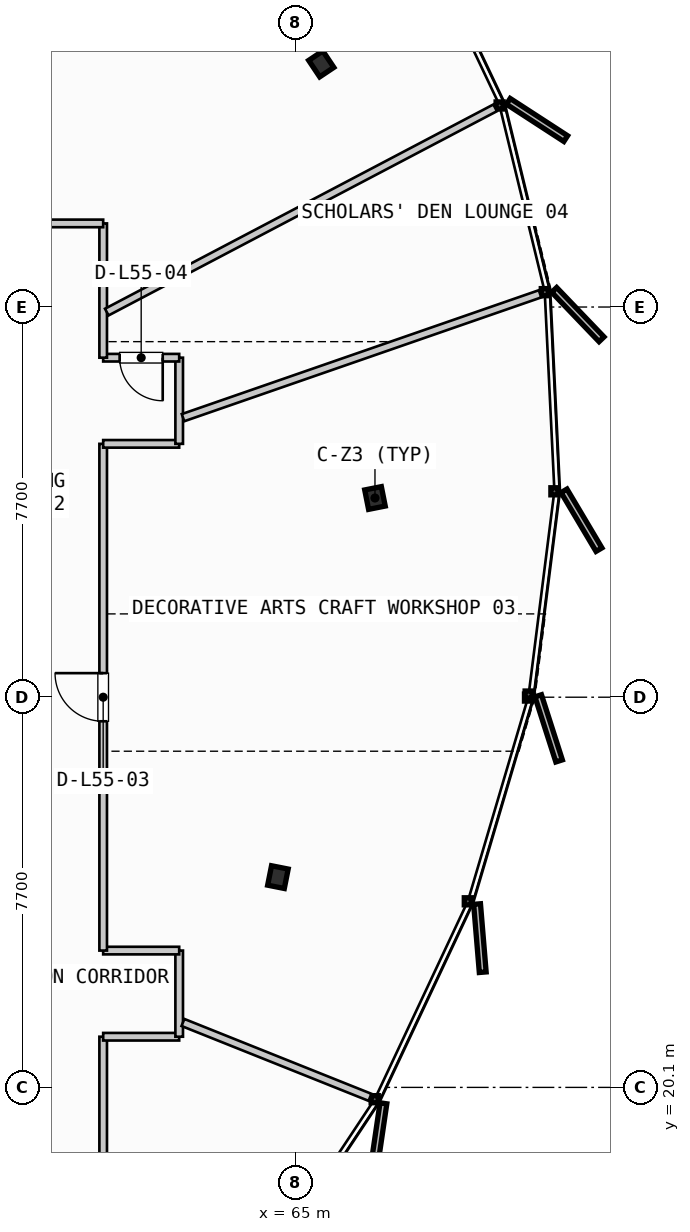
"""IFC4 building model, lengths in metres.
Left out: names, types, materials, properties, quantities, classifications, styles, units other than length and angle.
Written with IfcOpenShell. Run it as: python <this file> out.ifc"""

import sys

from ifc_helpers import new_model, si_unit, direction, frame, frame_2d, origin, origin_2d, place, context, subcontext, project, spatial, rectangle, i_section, extrude, source, transform, mapped, element, fill, save


model = new_model("IFC4")
c1 = context("Model", 3, precision=1e-05, world=origin(), true_north=direction((0.0, 1.0)))
c2 = subcontext(c1, "Body", "Model", "MODEL_VIEW")
j1 = project(units=[si_unit("LENGTHUNIT", "METRE"), si_unit("PLANEANGLEUNIT", "RADIAN")], contexts=[c1])
p1 = place(None, origin())
s1 = spatial("IfcSite", under=j1, at=p1, CompositionType="ELEMENT")
p2 = place(p1, origin())
s2 = spatial("IfcBuilding", under=s1, at=p2, CompositionType="ELEMENT")
p3 = place(p2, frame((0.0, 0.0, 211.4)))
s3 = spatial("IfcBuildingStorey", under=s2, at=p3, CompositionType="ELEMENT", Elevation=211.4)
m1 = source(origin(), c2, "Body", "SweptSolid", [
    extrude(i_section(OverallWidth=0.391, OverallDepth=0.335, WebThickness=0.023, FlangeThickness=0.034, FilletRadius=0.015, at=origin_2d()), origin(), (0.0, 0.0, 1.0), 3.26),
])
for number, where, z_axis, x_axis in (
    (1, (66.564, 31.731, 0.0), (0.0, 0.0, 1.0), (0.981, 0.195, 0.0)),
    (2, (65.504, 40.298, 0.0), (0.0, 0.0, 1.0), (0.831, 0.556, 0.0)),
    (3, (64.649, 24.25, 0.0), (0.0, 0.0, 1.0), (0.981, -0.195, 0.0)),
):
    element("IfcColumn", number, at=place(p3, frame(where, z_axis=z_axis, x_axis=x_axis)), inside=s3, PredefinedType="COLUMN", context=c2, shape_type="MappedRepresentation", body=[
        mapped(m1, transform((0.0, 0.0, 0.0), scale=1.0)),
    ])
p4 = place(p3, frame((61.2, 18.45, 0.0), z_axis=(0.0, 0.0, 1.0), x_axis=(0.0, 1.0, 0.0)))
e4 = element("IfcWall", 4, at=p4, inside=s3, PredefinedType="PARTITIONING", context=c2, shape_type="SweptSolid", body=[
    extrude(rectangle(XDim=2.65, YDim=0.15, at=frame_2d((1.325, 0.0))), origin(), (0.0, 0.0, 1.0), 2.455),
])
p5 = place(p3, frame((61.2, 21.1, 0.0), z_axis=(0.0, 0.0, 1.0), x_axis=(1.0, 0.0, 0.0)))
e5 = element("IfcWall", 5, at=p5, inside=s3, PredefinedType="PARTITIONING", context=c2, shape_type="SweptSolid", body=[
    extrude(rectangle(XDim=1.5, YDim=0.15, at=frame_2d((0.75, 0.0))), origin(), (0.0, 0.0, 1.0), 2.455),
])
p6 = place(p3, frame((62.7, 21.1, 0.0), z_axis=(0.0, 0.0, 1.0), x_axis=(0.0, 1.0, 0.0)))
e6 = element("IfcWall", 6, at=p6, inside=s3, PredefinedType="PARTITIONING", context=c2, shape_type="SweptSolid", body=[
    extrude(rectangle(XDim=1.7, YDim=0.15, at=frame_2d((0.85, 0.0))), origin(), (0.0, 0.0, 1.0), 2.455),
])
p7 = place(p3, frame((62.7, 22.8, 0.0), z_axis=(0.0, 0.0, 1.0), x_axis=(-1.0, 0.0, 0.0)))
e7 = element("IfcWall", 7, at=p7, inside=s3, PredefinedType="PARTITIONING", context=c2, shape_type="SweptSolid", body=[
    extrude(rectangle(XDim=1.5, YDim=0.15, at=frame_2d((0.75, 0.0))), origin(), (0.0, 0.0, 1.0), 2.455),
])
p8 = place(p3, frame((61.2, 22.8, 0.0), z_axis=(0.0, 0.0, 1.0), x_axis=(0.0, 1.0, 0.0)))
e8 = element("IfcWall", 8, at=p8, inside=s3, PredefinedType="PARTITIONING", context=c2, shape_type="SweptSolid", body=[
    extrude(rectangle(XDim=10.0, YDim=0.15, at=frame_2d((5.0, 0.0))), origin(), (0.0, 0.0, 1.0), 2.455),
])
p9 = place(p8, frame((4.525, 0.0, 0.0)))
e9 = element("IfcOpeningElement", 9, at=p9, cuts=e8, PredefinedType="OPENING", context=c2, shape_type="SweptSolid", body=[
    extrude(rectangle(XDim=0.95, YDim=2.15, at=frame_2d((0.475, 1.075))), frame((0.0, 0.085, 0.0), z_axis=(0.0, -1.0, 0.0), x_axis=(1.0, 0.0, 0.0)), (0.0, 0.0, 1.0), 0.17),
])
p10 = place(p3, frame((61.2, 32.8, 0.0), z_axis=(0.0, 0.0, 1.0), x_axis=(1.0, 0.0, 0.0)))
e10 = element("IfcWall", 10, at=p10, inside=s3, PredefinedType="PARTITIONING", context=c2, shape_type="SweptSolid", body=[
    extrude(rectangle(XDim=1.5, YDim=0.15, at=frame_2d((0.75, 0.0))), origin(), (0.0, 0.0, 1.0), 2.455),
])
p11 = place(p3, frame((62.7, 32.8, 0.0), z_axis=(0.0, 0.0, 1.0), x_axis=(0.0, 1.0, 0.0)))
e11 = element("IfcWall", 11, at=p11, inside=s3, PredefinedType="PARTITIONING", context=c2, shape_type="SweptSolid", body=[
    extrude(rectangle(XDim=1.7, YDim=0.15, at=frame_2d((0.85, 0.0))), origin(), (0.0, 0.0, 1.0), 2.455),
])
p12 = place(p3, frame((62.7, 34.5, 0.0), z_axis=(0.0, 0.0, 1.0), x_axis=(-1.0, 0.0, 0.0)))
e12 = element("IfcWall", 12, at=p12, inside=s3, PredefinedType="PARTITIONING", context=c2, shape_type="SweptSolid", body=[
    extrude(rectangle(XDim=1.5, YDim=0.15, at=frame_2d((0.75, 0.0))), origin(), (0.0, 0.0, 1.0), 2.455),
])
p13 = place(p12, frame((0.325, 0.0, 0.0)))
e13 = element("IfcOpeningElement", 13, at=p13, cuts=e12, PredefinedType="OPENING", context=c2, shape_type="SweptSolid", body=[
    extrude(rectangle(XDim=0.85, YDim=2.15, at=frame_2d((0.425, 1.075))), frame((0.0, 0.085, 0.0), z_axis=(0.0, -1.0, 0.0), x_axis=(1.0, 0.0, 0.0)), (0.0, 0.0, 1.0), 0.17),
])
p14 = place(p3, frame((61.2, 34.5, 0.0), z_axis=(0.0, 0.0, 1.0), x_axis=(0.0, 1.0, 0.0)))
e14 = element("IfcWall", 14, at=p14, inside=s3, PredefinedType="PARTITIONING", context=c2, shape_type="SweptSolid", body=[
    extrude(rectangle(XDim=2.65, YDim=0.15, at=frame_2d((1.325, 0.0))), origin(), (0.0, 0.0, 1.0), 2.455),
])
p15 = place(p3, frame((61.2, 37.15, 0.0), z_axis=(0.0, 0.0, 1.0), x_axis=(-1.0, 0.0, 0.0)))
e15 = element("IfcWall", 15, at=p15, inside=s3, PredefinedType="PARTITIONING", context=c2, shape_type="SweptSolid", body=[
    extrude(rectangle(XDim=28.35, YDim=0.15, at=frame_2d((14.175, 0.0))), origin(), (0.0, 0.0, 1.0), 2.455),
])
p16 = place(p15, frame((13.7, 0.0, 0.0)))
e16 = element("IfcOpeningElement", 16, at=p16, cuts=e15, PredefinedType="OPENING", context=c2, shape_type="SweptSolid", body=[
    extrude(rectangle(XDim=0.95, YDim=2.15, at=frame_2d((0.475, 1.075))), frame((0.0, 0.085, 0.0), z_axis=(0.0, -1.0, 0.0), x_axis=(1.0, 0.0, 0.0)), (0.0, 0.0, 1.0), 0.17),
])
p17 = place(p3, frame((62.774, 21.381, 0.0), z_axis=(0.0, 0.0, 1.0), x_axis=(0.928434336996, -0.371496543573, 0.0)))
e17 = element("IfcWall", 17, at=p17, inside=s3, PredefinedType="PARTITIONING", context=c2, shape_type="SweptSolid", body=[
    extrude(rectangle(XDim=3.976, YDim=0.15, at=frame_2d((1.988, 0.0))), origin(), (0.0, 0.0, 1.0), 2.455),
])
p18 = place(p3, frame((62.776, 33.317, 0.0), z_axis=(0.0, 0.0, 1.0), x_axis=(0.944787019259, 0.327685044274, 0.0)))
e18 = element("IfcWall", 18, at=p18, inside=s3, PredefinedType="PARTITIONING", context=c2, shape_type="SweptSolid", body=[
    extrude(rectangle(XDim=7.458, YDim=0.15, at=frame_2d((3.729, 0.0))), origin(), (0.0, 0.0, 1.0), 2.455),
])
p19 = place(p3, frame((61.271, 35.4, 0.0), z_axis=(0.0, 0.0, 1.0), x_axis=(0.885089383212, 0.465421082168, 0.0)))
e19 = element("IfcWall", 19, at=p19, inside=s3, PredefinedType="PARTITIONING", context=c2, shape_type="SweptSolid", body=[
    extrude(rectangle(XDim=8.66, YDim=0.15, at=frame_2d((4.33, 0.0))), origin(), (0.0, 0.0, 1.0), 2.455),
])
m2 = source(origin(), c2, "Body", "SweptSolid", [
    extrude(rectangle(XDim=0.95, YDim=2.15, at=frame_2d((0.475, 1.075))), frame((0.0, 0.025, 0.0), z_axis=(0.0, -1.0, 0.0), x_axis=(1.0, 0.0, 0.0)), (0.0, 0.0, 1.0), 0.05),
])
p20 = place(p9, origin())
e20 = element("IfcDoor", 20, at=p20, inside=s3, OperationType="SINGLE_SWING_RIGHT", PredefinedType="DOOR", context=c2, shape_type="MappedRepresentation", body=[
    mapped(m2, transform((0.0, 0.0, 0.0), scale=1.0)),
])
fill(e9, e20)
m3 = source(origin(), c2, "Body", "SweptSolid", [
    extrude(rectangle(XDim=0.85, YDim=2.15, at=frame_2d((0.425, 1.075))), frame((0.0, 0.025, 0.0), z_axis=(0.0, -1.0, 0.0), x_axis=(1.0, 0.0, 0.0)), (0.0, 0.0, 1.0), 0.05),
])
p21 = place(p13, origin())
e21 = element("IfcDoor", 21, at=p21, inside=s3, OperationType="SINGLE_SWING_LEFT", PredefinedType="DOOR", context=c2, shape_type="MappedRepresentation", body=[
    mapped(m3, transform((0.0, 0.0, 0.0), scale=1.0)),
])
fill(e13, e21)
save(model, sys.argv[1])
